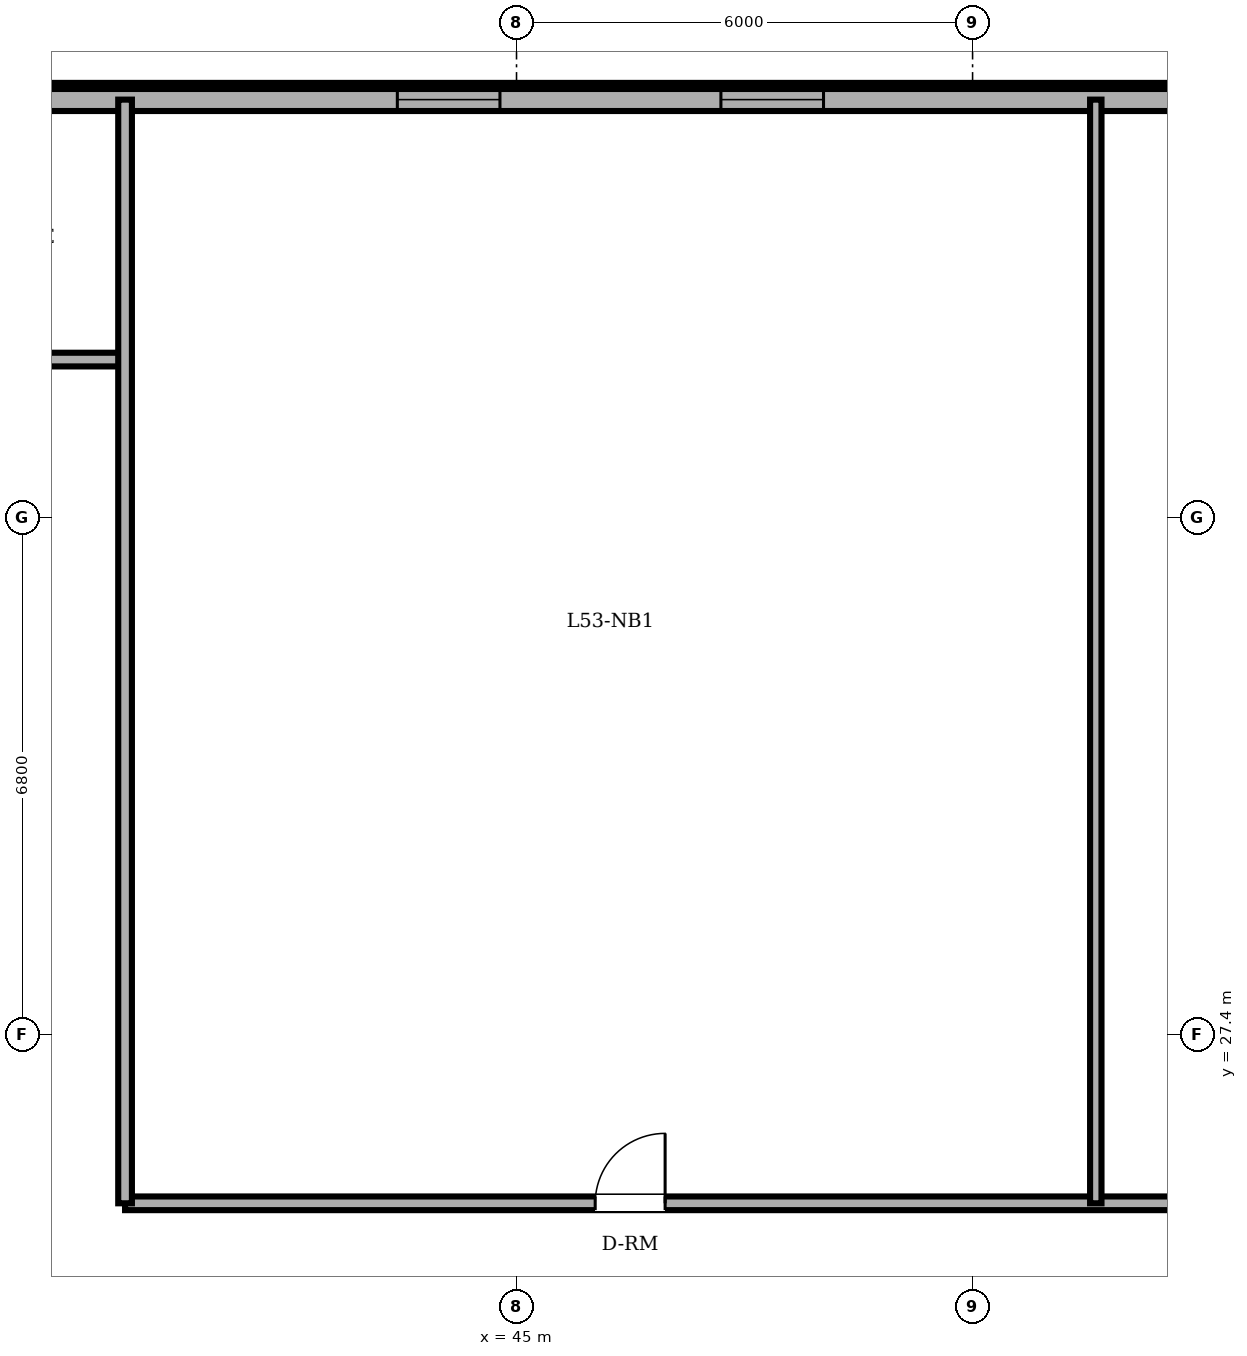
"""IFC4 building model, lengths in metres.
Left out: names, types, materials, properties, quantities, classifications, styles, units other than length and angle.
Written with IfcOpenShell. Run it as: python <this file> out.ifc"""

import sys

from ifc_helpers import new_model, si_unit, direction, frame, frame_2d, origin, place, context, subcontext, project, spatial, rectangle, extrude, element, fill, save


model = new_model("IFC4")
c1 = context("Model", 3, precision=1e-05, world=origin(), true_north=direction((0.0, 1.0)))
c2 = subcontext(c1, "Body", "Model", "MODEL_VIEW")
j1 = project(units=[si_unit("LENGTHUNIT", "METRE"), si_unit("PLANEANGLEUNIT", "RADIAN")], contexts=[c1])
p1 = place(None, origin())
s1 = spatial("IfcSite", under=j1, at=p1, CompositionType="ELEMENT")
p2 = place(p1, origin())
s2 = spatial("IfcBuilding", under=s1, at=p2, CompositionType="ELEMENT")
p3 = place(p2, frame((0.0, 0.0, 204.9)))
s3 = spatial("IfcBuildingStorey", under=s2, at=p3, CompositionType="ELEMENT", Elevation=204.9)
p4 = place(p3, frame((54.885, 39.7, 0.0), z_axis=(0.0, 0.0, 1.0), x_axis=(-1.0, 0.0, 0.0)))
e1 = element("IfcWall", 1, at=p4, inside=s3, PredefinedType="SOLIDWALL", context=c2, shape_type="SweptSolid", body=[
    extrude(rectangle(XDim=32.485, YDim=0.3, at=frame_2d((16.243, 0.0))), origin(), (0.0, 0.0, 1.0), 3.4),
])
p5 = place(p4, frame((26.485, 0.0, 0.0)))
e2 = element("IfcOpeningElement", 2, at=p5, cuts=e1, PredefinedType="OPENING", context=c2, shape_type="SweptSolid", body=[
    extrude(rectangle(XDim=0.95, YDim=2.2, at=frame_2d((0.475, 1.1))), frame((0.0, 0.16, 0.0), z_axis=(0.0, -1.0, 0.0), x_axis=(1.0, 0.0, 0.0)), (0.0, 0.0, 1.0), 0.32),
])
p6 = place(p4, frame((5.846, 0.0, 0.85)))
e3 = element("IfcOpeningElement", 3, at=p6, cuts=e1, PredefinedType="OPENING", context=c2, shape_type="SweptSolid", body=[
    extrude(rectangle(XDim=1.35, YDim=1.55, at=frame_2d((0.675, 0.775))), frame((0.0, 0.16, 0.0), z_axis=(0.0, -1.0, 0.0), x_axis=(1.0, 0.0, 0.0)), (0.0, 0.0, 1.0), 0.32),
])
p7 = place(p4, frame((10.103, 0.0, 0.85)))
e4 = element("IfcOpeningElement", 4, at=p7, cuts=e1, PredefinedType="OPENING", context=c2, shape_type="SweptSolid", body=[
    extrude(rectangle(XDim=1.35, YDim=1.55, at=frame_2d((0.675, 0.775))), frame((0.0, 0.16, 0.0), z_axis=(0.0, -1.0, 0.0), x_axis=(1.0, 0.0, 0.0)), (0.0, 0.0, 1.0), 0.32),
])
p8 = place(p4, frame((16.577, 0.0, 0.85)))
e5 = element("IfcOpeningElement", 5, at=p8, cuts=e1, PredefinedType="OPENING", context=c2, shape_type="SweptSolid", body=[
    extrude(rectangle(XDim=1.35, YDim=1.55, at=frame_2d((0.675, 0.775))), frame((0.0, 0.16, 0.0), z_axis=(0.0, -1.0, 0.0), x_axis=(1.0, 0.0, 0.0)), (0.0, 0.0, 1.0), 0.32),
])
p9 = place(p4, frame((18.793, 0.0, 0.85)))
e6 = element("IfcOpeningElement", 6, at=p9, cuts=e1, PredefinedType="OPENING", context=c2, shape_type="SweptSolid", body=[
    extrude(rectangle(XDim=1.35, YDim=1.55, at=frame_2d((0.675, 0.775))), frame((0.0, 0.16, 0.0), z_axis=(0.0, -1.0, 0.0), x_axis=(1.0, 0.0, 0.0)), (0.0, 0.0, 1.0), 0.32),
])
p10 = place(p4, frame((22.91, 0.0, 0.85)))
e7 = element("IfcOpeningElement", 7, at=p10, cuts=e1, PredefinedType="OPENING", context=c2, shape_type="SweptSolid", body=[
    extrude(rectangle(XDim=1.35, YDim=1.55, at=frame_2d((0.675, 0.775))), frame((0.0, 0.16, 0.0), z_axis=(0.0, -1.0, 0.0), x_axis=(1.0, 0.0, 0.0)), (0.0, 0.0, 1.0), 0.32),
])
p11 = place(p4, frame((29.835, 0.0, 0.85)))
e8 = element("IfcOpeningElement", 8, at=p11, cuts=e1, PredefinedType="OPENING", context=c2, shape_type="SweptSolid", body=[
    extrude(rectangle(XDim=1.35, YDim=1.55, at=frame_2d((0.675, 0.775))), frame((0.0, 0.16, 0.0), z_axis=(0.0, -1.0, 0.0), x_axis=(1.0, 0.0, 0.0)), (0.0, 0.0, 1.0), 0.32),
])
p12 = place(p3, frame((39.85, 25.18, 0.0), z_axis=(0.0, 0.0, 1.0), x_axis=(1.0, 0.0, 0.0)))
e9 = element("IfcWall", 9, at=p12, inside=s3, PredefinedType="PARTITIONING", context=c2, shape_type="SweptSolid", body=[
    extrude(rectangle(XDim=28.75, YDim=0.18, at=frame_2d((14.375, 0.0))), origin(), (0.0, 0.0, 1.0), 3.4),
])
p13 = place(p12, frame((6.185, 0.0, 0.0)))
e10 = element("IfcOpeningElement", 10, at=p13, cuts=e9, PredefinedType="OPENING", context=c2, shape_type="SweptSolid", body=[
    extrude(rectangle(XDim=0.92, YDim=2.1, at=frame_2d((0.46, 1.05))), frame((0.0, 0.1, 0.0), z_axis=(0.0, -1.0, 0.0), x_axis=(1.0, 0.0, 0.0)), (0.0, 0.0, 1.0), 0.2),
])
p14 = place(p12, frame((15.601, 0.0, 0.0)))
e11 = element("IfcOpeningElement", 11, at=p14, cuts=e9, PredefinedType="OPENING", context=c2, shape_type="SweptSolid", body=[
    extrude(rectangle(XDim=0.92, YDim=2.1, at=frame_2d((0.46, 1.05))), frame((0.0, 0.1, 0.0), z_axis=(0.0, -1.0, 0.0), x_axis=(1.0, 0.0, 0.0)), (0.0, 0.0, 1.0), 0.2),
])
p15 = place(p12, frame((21.15, 0.0, 0.0)))
e12 = element("IfcOpeningElement", 12, at=p15, cuts=e9, PredefinedType="OPENING", context=c2, shape_type="SweptSolid", body=[
    extrude(rectangle(XDim=1.0, YDim=2.15, at=frame_2d((0.5, 1.075))), frame((0.0, 0.1, 0.0), z_axis=(0.0, -1.0, 0.0), x_axis=(1.0, 0.0, 0.0)), (0.0, 0.0, 1.0), 0.2),
])
p16 = place(p3, frame((17.677, 36.28, 0.0), z_axis=(0.0, 0.0, 1.0), x_axis=(1.0, 0.0, 0.0)))
e13 = element("IfcWall", 13, at=p16, inside=s3, PredefinedType="PARTITIONING", context=c2, shape_type="SweptSolid", body=[
    extrude(rectangle(XDim=22.173, YDim=0.18, at=frame_2d((11.086, 0.0))), origin(), (0.0, 0.0, 1.0), 3.4),
])
p17 = place(p16, frame((9.573, 0.0, 0.0)))
e14 = element("IfcOpeningElement", 14, at=p17, cuts=e13, PredefinedType="OPENING", context=c2, shape_type="SweptSolid", body=[
    extrude(rectangle(XDim=0.9, YDim=2.1, at=frame_2d((0.45, 1.05))), frame((0.0, 0.1, 0.0), z_axis=(0.0, -1.0, 0.0), x_axis=(1.0, 0.0, 0.0)), (0.0, 0.0, 1.0), 0.2),
])
p18 = place(p16, frame((13.193, 0.0, 0.0)))
e15 = element("IfcOpeningElement", 15, at=p18, cuts=e13, PredefinedType="OPENING", context=c2, shape_type="SweptSolid", body=[
    extrude(rectangle(XDim=0.86, YDim=2.1, at=frame_2d((0.43, 1.05))), frame((0.0, 0.1, 0.0), z_axis=(0.0, -1.0, 0.0), x_axis=(1.0, 0.0, 0.0)), (0.0, 0.0, 1.0), 0.2),
])
p19 = place(p16, frame((4.063, 0.0, 0.0)))
e16 = element("IfcOpeningElement", 16, at=p19, cuts=e13, PredefinedType="OPENING", context=c2, shape_type="SweptSolid", body=[
    extrude(rectangle(XDim=0.92, YDim=2.1, at=frame_2d((0.46, 1.05))), frame((0.0, 0.1, 0.0), z_axis=(0.0, -1.0, 0.0), x_axis=(1.0, 0.0, 0.0)), (0.0, 0.0, 1.0), 0.2),
])
p20 = place(p16, frame((18.128, 0.0, 0.0)))
e17 = element("IfcOpeningElement", 17, at=p20, cuts=e13, PredefinedType="OPENING", context=c2, shape_type="SweptSolid", body=[
    extrude(rectangle(XDim=0.92, YDim=2.1, at=frame_2d((0.46, 1.05))), frame((0.0, 0.1, 0.0), z_axis=(0.0, -1.0, 0.0), x_axis=(1.0, 0.0, 0.0)), (0.0, 0.0, 1.0), 0.2),
])
p21 = place(p3, frame((39.85, 25.18, 0.0), z_axis=(0.0, 0.0, 1.0), x_axis=(0.0, 1.0, 0.0)))
e18 = element("IfcWall", 18, at=p21, inside=s3, PredefinedType="PARTITIONING", context=c2, shape_type="SweptSolid", body=[
    extrude(rectangle(XDim=14.52, YDim=0.18, at=frame_2d((7.26, 0.0))), origin(), (0.0, 0.0, 1.0), 3.4),
])
p22 = place(p3, frame((52.621, 25.18, 0.0), z_axis=(0.0, 0.0, 1.0), x_axis=(0.0, 1.0, 0.0)))
e19 = element("IfcWall", 19, at=p22, inside=s3, PredefinedType="PARTITIONING", context=c2, shape_type="SweptSolid", body=[
    extrude(rectangle(XDim=14.52, YDim=0.15, at=frame_2d((7.26, 0.0))), origin(), (0.0, 0.0, 1.0), 3.4),
])
p23 = place(p6, origin())
e20 = element("IfcWindow", 20, at=p23, inside=s3, PartitioningType="SINGLE_PANEL", PredefinedType="WINDOW", context=c2, shape_type="SweptSolid", body=[
    extrude(rectangle(XDim=1.35, YDim=1.55, at=frame_2d((0.675, 0.775))), frame((0.0, 0.03, 0.0), z_axis=(0.0, -1.0, 0.0), x_axis=(1.0, 0.0, 0.0)), (0.0, 0.0, 1.0), 0.06),
])
fill(e3, e20)
p24 = place(p7, origin())
e21 = element("IfcWindow", 21, at=p24, inside=s3, PartitioningType="SINGLE_PANEL", PredefinedType="WINDOW", context=c2, shape_type="SweptSolid", body=[
    extrude(rectangle(XDim=1.35, YDim=1.55, at=frame_2d((0.675, 0.775))), frame((0.0, 0.03, 0.0), z_axis=(0.0, -1.0, 0.0), x_axis=(1.0, 0.0, 0.0)), (0.0, 0.0, 1.0), 0.06),
])
fill(e4, e21)
p25 = place(p13, origin())
e22 = element("IfcDoor", 22, at=p25, inside=s3, OperationType="SINGLE_SWING_RIGHT", PredefinedType="DOOR", context=c2, shape_type="SweptSolid", body=[
    extrude(rectangle(XDim=0.92, YDim=2.1, at=frame_2d((0.46, 1.05))), frame((0.0, 0.025, 0.0), z_axis=(0.0, -1.0, 0.0), x_axis=(1.0, 0.0, 0.0)), (0.0, 0.0, 1.0), 0.05),
])
fill(e10, e22)
save(model, sys.argv[1])
